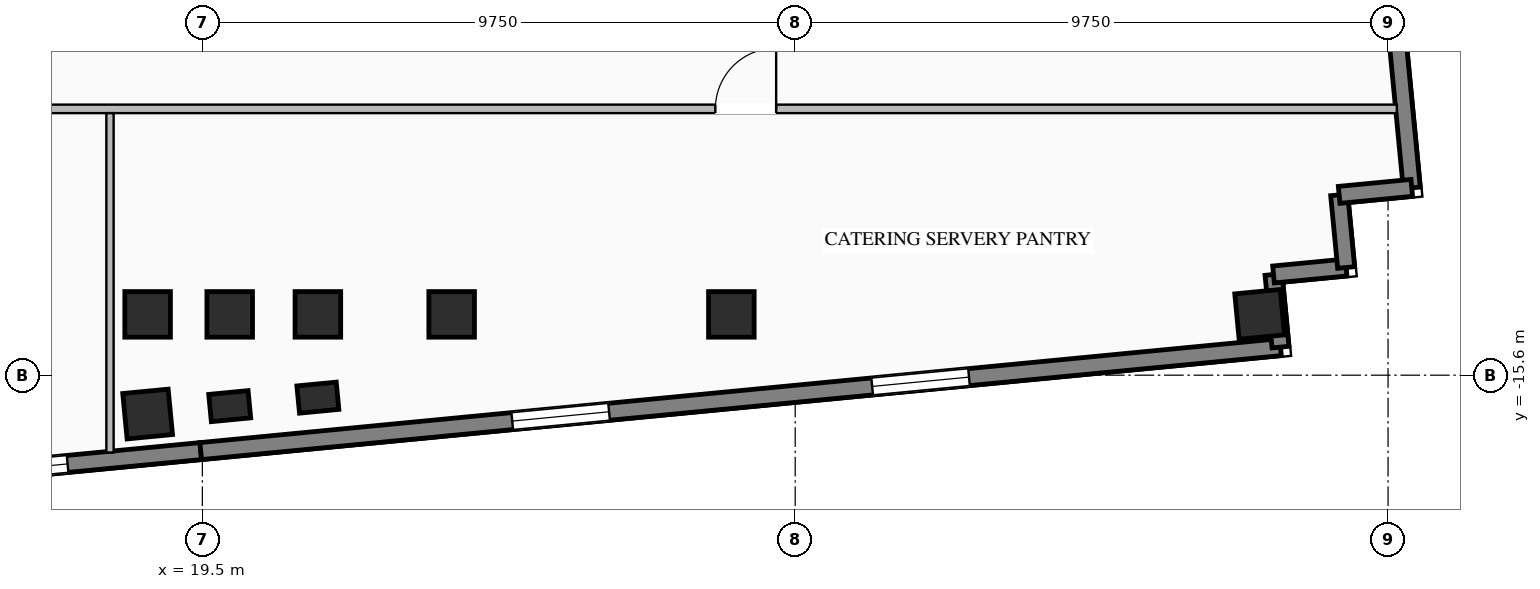
"""IFC4 building model, lengths in metres.
Left out: names, types, materials, properties, quantities, classifications, styles, units other than length and angle.
Written with IfcOpenShell. Run it as: python <this file> out.ifc"""

import sys

from ifc_helpers import new_model, si_unit, direction, frame, frame_2d, origin, origin_2d, place, context, subcontext, project, spatial, rectangle, i_section, extrude, element, fill, save


model = new_model("IFC4")
c1 = context("Model", 3, precision=1e-05, world=origin(), true_north=direction((0.0, 1.0)))
c2 = subcontext(c1, "Body", "Model", "MODEL_VIEW")
j1 = project(units=[si_unit("LENGTHUNIT", "METRE"), si_unit("PLANEANGLEUNIT", "RADIAN")], contexts=[c1])
p1 = place(None, origin())
s1 = spatial("IfcSite", under=j1, at=p1, CompositionType="ELEMENT")
p2 = place(p1, origin())
s2 = spatial("IfcBuilding", under=s1, at=p2, CompositionType="ELEMENT")
p3 = place(p2, frame((0.0, 0.0, 74.2)))
s3 = spatial("IfcBuildingStorey", under=s2, at=p3, CompositionType="ELEMENT", Elevation=74.2)
for number, where, z_axis, x_axis in (
    (1, (18.6, -14.6, 0.0), (0.0, 0.0, 1.0), (1.0, 0.0, 0.0)),
    (2, (19.95, -14.6, 0.0), (0.0, 0.0, 1.0), (1.0, 0.0, 0.0)),
    (3, (21.4, -14.6, 0.0), (0.0, 0.0, 1.0), (1.0, 0.0, 0.0)),
    (4, (23.6, -14.6, 0.0), (0.0, 0.0, 1.0), (1.0, 0.0, 0.0)),
    (5, (28.2, -14.6, 0.0), (0.0, 0.0, 1.0), (1.0, 0.0, 0.0)),
    (6, (18.6, -16.239, 0.0), (0.0, 0.0, 1.0), (0.995, 0.096, 0.0)),
    (7, (36.888, -14.6, 0.0), (0.0, 0.0, 1.0), (0.995, 0.096, 0.0)),
):
    element("IfcColumn", number, at=place(p3, frame(where, z_axis=z_axis, x_axis=x_axis)), inside=s3, PredefinedType="COLUMN", context=c2, shape_type="SweptSolid", body=[
        extrude(i_section(OverallWidth=0.75, OverallDepth=0.75, WebThickness=0.03, FlangeThickness=0.044, at=origin_2d()), origin(), (0.0, 0.0, 1.0), 3.45),
    ])
for number, where, z_axis, x_axis in (
    (8, (19.95, -16.109, 0.0), (0.0, 0.0, 1.0), (0.995, 0.096, 0.0)),
    (9, (21.4, -15.969, 0.0), (0.0, 0.0, 1.0), (0.995, 0.096, 0.0)),
):
    element("IfcColumn", number, at=place(p3, frame(where, z_axis=z_axis, x_axis=x_axis)), inside=s3, PredefinedType="PILASTER", context=c2, shape_type="SweptSolid", body=[
        extrude(rectangle(XDim=0.65, YDim=0.45, at=origin_2d()), origin(), (0.0, 0.0, 1.0), 3.45),
    ])
p4 = place(p3, frame((19.474, -16.848, 0.0), z_axis=(0.0, 0.0, 1.0), x_axis=(-0.995396794462, -0.09583956164, 0.0)))
e10 = element("IfcWall", 10, at=p4, inside=s3, PredefinedType="STANDARD", context=c2, shape_type="SweptSolid", body=[
    extrude(rectangle(XDim=9.0, YDim=0.28, at=frame_2d((4.5, 0.0))), origin(), (0.0, 0.0, 1.0), 3.25),
])
p5 = place(p4, frame((2.2, 0.0, 0.76)))
e11 = element("IfcOpeningElement", 11, at=p5, cuts=e10, PredefinedType="OPENING", context=c2, shape_type="SweptSolid", body=[
    extrude(rectangle(XDim=1.6, YDim=1.95, at=frame_2d((0.8, 0.975))), frame((0.0, 0.15, 0.0), z_axis=(0.0, -1.0, 0.0), x_axis=(1.0, 0.0, 0.0)), (0.0, 0.0, 1.0), 0.3),
])
p6 = place(p4, frame((5.2, 0.0, 0.76)))
e12 = element("IfcOpeningElement", 12, at=p6, cuts=e10, PredefinedType="OPENING", context=c2, shape_type="SweptSolid", body=[
    extrude(rectangle(XDim=1.6, YDim=1.95, at=frame_2d((0.8, 0.975))), frame((0.0, 0.15, 0.0), z_axis=(0.0, -1.0, 0.0), x_axis=(1.0, 0.0, 0.0)), (0.0, 0.0, 1.0), 0.3),
])
p7 = place(p3, frame((37.231, -15.138, 0.0), z_axis=(0.0, 0.0, 1.0), x_axis=(-0.995395780835, -0.095850088663, 0.0)))
e13 = element("IfcWall", 13, at=p7, inside=s3, PredefinedType="STANDARD", context=c2, shape_type="SweptSolid", body=[
    extrude(rectangle(XDim=17.84, YDim=0.28, at=frame_2d((8.92, 0.0))), origin(), (0.0, 0.0, 1.0), 3.25),
])
p8 = place(p7, frame((5.147, 0.0, 0.76)))
e14 = element("IfcOpeningElement", 14, at=p8, cuts=e13, PredefinedType="OPENING", context=c2, shape_type="SweptSolid", body=[
    extrude(rectangle(XDim=1.6, YDim=1.95, at=frame_2d((0.8, 0.975))), frame((0.0, 0.15, 0.0), z_axis=(0.0, -1.0, 0.0), x_axis=(1.0, 0.0, 0.0)), (0.0, 0.0, 1.0), 0.3),
])
p9 = place(p7, frame((11.093, 0.0, 0.76)))
e15 = element("IfcOpeningElement", 15, at=p9, cuts=e13, PredefinedType="OPENING", context=c2, shape_type="SweptSolid", body=[
    extrude(rectangle(XDim=1.6, YDim=1.95, at=frame_2d((0.8, 0.975))), frame((0.0, 0.15, 0.0), z_axis=(0.0, -1.0, 0.0), x_axis=(1.0, 0.0, 0.0)), (0.0, 0.0, 1.0), 0.3),
])
p10 = place(p3, frame((37.585, 6.234, 0.0), z_axis=(0.0, 0.0, 1.0), x_axis=(0.095841297881, -0.99539662729, 0.0)))
e16 = element("IfcWall", 16, at=p10, inside=s3, PredefinedType="STANDARD", context=c2, shape_type="SweptSolid", body=[
    extrude(rectangle(XDim=18.84, YDim=0.28, at=frame_2d((9.42, 0.0))), origin(), (0.0, 0.0, 1.0), 3.25),
])
p11 = place(p10, frame((5.58, 0.0, 0.76)))
e17 = element("IfcOpeningElement", 17, at=p11, cuts=e16, PredefinedType="OPENING", context=c2, shape_type="SweptSolid", body=[
    extrude(rectangle(XDim=1.4, YDim=1.95, at=frame_2d((0.7, 0.975))), frame((0.0, 0.15, 0.0), z_axis=(0.0, -1.0, 0.0), x_axis=(1.0, 0.0, 0.0)), (0.0, 0.0, 1.0), 0.3),
])
p12 = place(p10, frame((11.86, 0.0, 0.76)))
e18 = element("IfcOpeningElement", 18, at=p12, cuts=e16, PredefinedType="OPENING", context=c2, shape_type="SweptSolid", body=[
    extrude(rectangle(XDim=1.4, YDim=1.95, at=frame_2d((0.7, 0.975))), frame((0.0, 0.15, 0.0), z_axis=(0.0, -1.0, 0.0), x_axis=(1.0, 0.0, 0.0)), (0.0, 0.0, 1.0), 0.3),
])
for number, where, z_axis, x_axis in (
    (19, (37.231, -15.138, 0.0), (0.0, 0.0, 1.0), (-0.096, 0.995, 0.0)),
    (20, (37.116, -13.944, 0.0), (0.0, 0.0, 1.0), (0.995, 0.096, 0.0)),
):
    element("IfcWall", number, at=place(p3, frame(where, z_axis=z_axis, x_axis=x_axis)), inside=s3, PredefinedType="STANDARD", context=c2, shape_type="SweptSolid", body=[
        extrude(rectangle(XDim=1.2, YDim=0.28, at=frame_2d((0.6, 0.0))), origin(), (0.0, 0.0, 1.0), 2.495),
    ])
for number, where, z_axis, x_axis in (
    (21, (38.311, -13.829, 0.0), (0.0, 0.0, 1.0), (-0.096, 0.995, 0.0)),
    (22, (38.196, -12.635, 0.0), (0.0, 0.0, 1.0), (0.995, 0.096, 0.0)),
):
    element("IfcWall", number, at=place(p3, frame(where, z_axis=z_axis, x_axis=x_axis)), inside=s3, PredefinedType="STANDARD", context=c2, shape_type="SweptSolid", body=[
        extrude(rectangle(XDim=1.2, YDim=0.28, at=frame_2d((0.6, 0.0))), origin(), (0.0, 0.0, 1.0), 2.495),
    ])
p13 = place(p3, frame((-28.406, -11.22, 0.0), z_axis=(0.0, 0.0, 1.0), x_axis=(1.0, 0.0, 0.0)))
e23 = element("IfcWall", 23, at=p13, inside=s3, PredefinedType="STANDARD", context=c2, shape_type="SweptSolid", body=[
    extrude(rectangle(XDim=67.551, YDim=0.14, at=frame_2d((33.775, 0.0))), origin(), (0.0, 0.0, 1.0), 2.745),
])
p14 = place(p13, frame((15.496, 0.0, 0.0)))
e24 = element("IfcOpeningElement", 24, at=p14, cuts=e23, PredefinedType="OPENING", context=c2, shape_type="SweptSolid", body=[
    extrude(rectangle(XDim=0.92, YDim=2.08, at=frame_2d((0.46, 1.04))), frame((0.0, 0.08, 0.0), z_axis=(0.0, -1.0, 0.0), x_axis=(1.0, 0.0, 0.0)), (0.0, 0.0, 1.0), 0.16),
])
p15 = place(p13, frame((18.996, 0.0, 0.0)))
e25 = element("IfcOpeningElement", 25, at=p15, cuts=e23, PredefinedType="OPENING", context=c2, shape_type="SweptSolid", body=[
    extrude(rectangle(XDim=0.92, YDim=2.08, at=frame_2d((0.46, 1.04))), frame((0.0, 0.08, 0.0), z_axis=(0.0, -1.0, 0.0), x_axis=(1.0, 0.0, 0.0)), (0.0, 0.0, 1.0), 0.16),
])
p16 = place(p13, frame((21.846, 0.0, 0.0)))
e26 = element("IfcOpeningElement", 26, at=p16, cuts=e23, PredefinedType="OPENING", context=c2, shape_type="SweptSolid", body=[
    extrude(rectangle(XDim=0.92, YDim=2.08, at=frame_2d((0.46, 1.04))), frame((0.0, 0.08, 0.0), z_axis=(0.0, -1.0, 0.0), x_axis=(1.0, 0.0, 0.0)), (0.0, 0.0, 1.0), 0.16),
])
p17 = place(p13, frame((3.336, 0.0, 0.0)))
e27 = element("IfcOpeningElement", 27, at=p17, cuts=e23, PredefinedType="OPENING", context=c2, shape_type="SweptSolid", body=[
    extrude(rectangle(XDim=1.0, YDim=2.08, at=frame_2d((0.5, 1.04))), frame((0.0, 0.08, 0.0), z_axis=(0.0, -1.0, 0.0), x_axis=(1.0, 0.0, 0.0)), (0.0, 0.0, 1.0), 0.16),
])
p18 = place(p13, frame((10.313, 0.0, 0.0)))
e28 = element("IfcOpeningElement", 28, at=p18, cuts=e23, PredefinedType="OPENING", context=c2, shape_type="SweptSolid", body=[
    extrude(rectangle(XDim=1.0, YDim=2.08, at=frame_2d((0.5, 1.04))), frame((0.0, 0.08, 0.0), z_axis=(0.0, -1.0, 0.0), x_axis=(1.0, 0.0, 0.0)), (0.0, 0.0, 1.0), 0.16),
])
p19 = place(p13, frame((34.397, 0.0, 0.0)))
e29 = element("IfcOpeningElement", 29, at=p19, cuts=e23, PredefinedType="OPENING", context=c2, shape_type="SweptSolid", body=[
    extrude(rectangle(XDim=1.0, YDim=2.08, at=frame_2d((0.5, 1.04))), frame((0.0, 0.08, 0.0), z_axis=(0.0, -1.0, 0.0), x_axis=(1.0, 0.0, 0.0)), (0.0, 0.0, 1.0), 0.16),
])
p20 = place(p13, frame((56.343, 0.0, 0.0)))
e30 = element("IfcOpeningElement", 30, at=p20, cuts=e23, PredefinedType="OPENING", context=c2, shape_type="SweptSolid", body=[
    extrude(rectangle(XDim=1.0, YDim=2.08, at=frame_2d((0.5, 1.04))), frame((0.0, 0.08, 0.0), z_axis=(0.0, -1.0, 0.0), x_axis=(1.0, 0.0, 0.0)), (0.0, 0.0, 1.0), 0.16),
])
p21 = place(p3, frame((17.981, -16.872, 0.0), z_axis=(0.0, 0.0, 1.0), x_axis=(0.0, 1.0, 0.0)))
e31 = element("IfcWall", 31, at=p21, inside=s3, PredefinedType="STANDARD", context=c2, shape_type="SweptSolid", body=[
    extrude(rectangle(XDim=5.582, YDim=0.12, at=frame_2d((2.791, 0.0))), origin(), (0.0, 0.0, 1.0), 3.25),
])
p22 = place(p5, origin())
e32 = element("IfcWindow", 32, at=p22, inside=s3, PartitioningType="SINGLE_PANEL", PredefinedType="WINDOW", context=c2, shape_type="SweptSolid", body=[
    extrude(rectangle(XDim=1.6, YDim=1.95, at=frame_2d((0.8, 0.975))), frame((0.0, 0.03, 0.0), z_axis=(0.0, -1.0, 0.0), x_axis=(1.0, 0.0, 0.0)), (0.0, 0.0, 1.0), 0.06),
])
fill(e11, e32)
p23 = place(p8, origin())
e33 = element("IfcWindow", 33, at=p23, inside=s3, PartitioningType="SINGLE_PANEL", PredefinedType="WINDOW", context=c2, shape_type="SweptSolid", body=[
    extrude(rectangle(XDim=1.6, YDim=1.95, at=frame_2d((0.8, 0.975))), frame((0.0, 0.03, 0.0), z_axis=(0.0, -1.0, 0.0), x_axis=(1.0, 0.0, 0.0)), (0.0, 0.0, 1.0), 0.06),
])
fill(e14, e33)
p24 = place(p9, origin())
e34 = element("IfcWindow", 34, at=p24, inside=s3, PartitioningType="SINGLE_PANEL", PredefinedType="WINDOW", context=c2, shape_type="SweptSolid", body=[
    extrude(rectangle(XDim=1.6, YDim=1.95, at=frame_2d((0.8, 0.975))), frame((0.0, 0.03, 0.0), z_axis=(0.0, -1.0, 0.0), x_axis=(1.0, 0.0, 0.0)), (0.0, 0.0, 1.0), 0.06),
])
fill(e15, e34)
p25 = place(p20, origin())
e35 = element("IfcDoor", 35, at=p25, inside=s3, OperationType="SINGLE_SWING_RIGHT", PredefinedType="DOOR", context=c2, shape_type="SweptSolid", body=[
    extrude(rectangle(XDim=1.0, YDim=2.08, at=frame_2d((0.5, 1.04))), frame((0.0, 0.025, 0.0), z_axis=(0.0, -1.0, 0.0), x_axis=(1.0, 0.0, 0.0)), (0.0, 0.0, 1.0), 0.05),
])
fill(e30, e35)
save(model, sys.argv[1])
